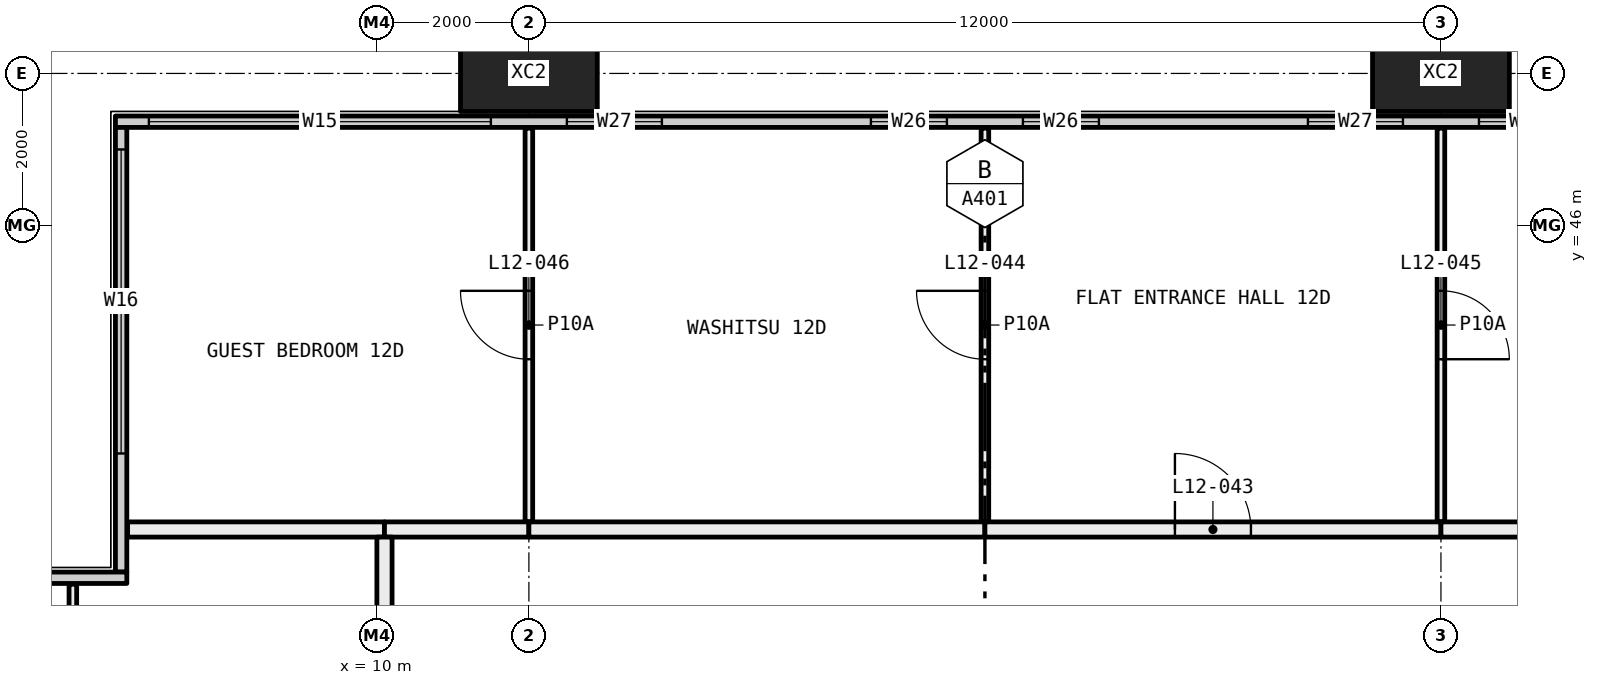
"""IFC4 building model, lengths in metres.
Left out: names, types, materials, properties, quantities, classifications, styles, units other than length and angle.
Written with IfcOpenShell. Run it as: python <this file> out.ifc"""

import sys

from ifc_helpers import new_model, si_unit, direction, frame, frame_2d, origin, origin_2d, place, context, subcontext, project, spatial, rectangle, hollow_rectangle, extrude, element, fill, save


model = new_model("IFC4")
c1 = context("Model", 3, precision=1e-05, world=origin(), true_north=direction((0.0, 1.0)))
c2 = subcontext(c1, "Body", "Model", "MODEL_VIEW")
j1 = project(units=[si_unit("LENGTHUNIT", "METRE"), si_unit("PLANEANGLEUNIT", "RADIAN")], contexts=[c1])
p1 = place(None, origin())
s1 = spatial("IfcSite", under=j1, at=p1, CompositionType="ELEMENT")
p2 = place(p1, origin())
s2 = spatial("IfcBuilding", under=s1, at=p2, CompositionType="ELEMENT")
p3 = place(p2, frame((0.0, 0.0, 54.15)))
s3 = spatial("IfcBuildingStorey", under=s2, at=p3, CompositionType="ELEMENT", Elevation=54.15)
for number, where, z_axis, x_axis in (
    (1, (12.0, 48.0, -0.4), (0.0, 0.0, 1.0), (1.0, 0.0, 0.0)),
    (2, (24.0, 48.0, -0.4), (0.0, 0.0, 1.0), (1.0, 0.0, 0.0)),
):
    element("IfcColumn", number, at=place(p3, frame(where, z_axis=z_axis, x_axis=x_axis)), inside=s3, PredefinedType="COLUMN", context=c2, shape_type="SweptSolid", body=[
        extrude(hollow_rectangle(XDim=1.8, YDim=1.0, WallThickness=0.07, at=origin_2d()), origin(), (0.0, 0.0, 1.0), 3.45),
    ])
p4 = place(p3, frame((6.56, 47.365, 0.0), z_axis=(0.0, 0.0, 1.0), x_axis=(1.0, 0.0, 0.0)))
e3 = element("IfcWall", 3, at=p4, inside=s3, PredefinedType="ELEMENTEDWALL", context=c2, shape_type="SweptSolid", body=[
    extrude(rectangle(XDim=58.88, YDim=0.15, at=frame_2d((29.44, 0.0))), origin(), (0.0, 0.0, 1.0), 3.05),
])
p5 = place(p4, frame((0.44, 0.0, 0.45)))
e4 = element("IfcOpeningElement", 4, at=p5, cuts=e3, PredefinedType="OPENING", context=c2, shape_type="SweptSolid", body=[
    extrude(rectangle(XDim=4.5, YDim=2.55, at=frame_2d((2.25, 1.275))), frame((0.0, 0.085, 0.0), z_axis=(0.0, -1.0, 0.0), x_axis=(1.0, 0.0, 0.0)), (0.0, 0.0, 1.0), 0.17),
])
p6 = place(p4, frame((5.94, 0.0, 0.45)))
e5 = element("IfcOpeningElement", 5, at=p6, cuts=e3, PredefinedType="OPENING", context=c2, shape_type="SweptSolid", body=[
    extrude(rectangle(XDim=1.25, YDim=2.55, at=frame_2d((0.625, 1.275))), frame((0.0, 0.085, 0.0), z_axis=(0.0, -1.0, 0.0), x_axis=(1.0, 0.0, 0.0)), (0.0, 0.0, 1.0), 0.17),
])
p7 = place(p4, frame((9.94, 0.0, 0.45)))
e6 = element("IfcOpeningElement", 6, at=p7, cuts=e3, PredefinedType="OPENING", context=c2, shape_type="SweptSolid", body=[
    extrude(rectangle(XDim=1.0, YDim=2.55, at=frame_2d((0.5, 1.275))), frame((0.0, 0.085, 0.0), z_axis=(0.0, -1.0, 0.0), x_axis=(1.0, 0.0, 0.0)), (0.0, 0.0, 1.0), 0.17),
])
p8 = place(p4, frame((11.94, 0.0, 0.45)))
e7 = element("IfcOpeningElement", 7, at=p8, cuts=e3, PredefinedType="OPENING", context=c2, shape_type="SweptSolid", body=[
    extrude(rectangle(XDim=1.0, YDim=2.55, at=frame_2d((0.5, 1.275))), frame((0.0, 0.085, 0.0), z_axis=(0.0, -1.0, 0.0), x_axis=(1.0, 0.0, 0.0)), (0.0, 0.0, 1.0), 0.17),
])
p9 = place(p4, frame((15.69, 0.0, 0.45)))
e8 = element("IfcOpeningElement", 8, at=p9, cuts=e3, PredefinedType="OPENING", context=c2, shape_type="SweptSolid", body=[
    extrude(rectangle(XDim=1.25, YDim=2.55, at=frame_2d((0.625, 1.275))), frame((0.0, 0.085, 0.0), z_axis=(0.0, -1.0, 0.0), x_axis=(1.0, 0.0, 0.0)), (0.0, 0.0, 1.0), 0.17),
])
p10 = place(p4, frame((17.94, 0.0, 0.45)))
e9 = element("IfcOpeningElement", 9, at=p10, cuts=e3, PredefinedType="OPENING", context=c2, shape_type="SweptSolid", body=[
    extrude(rectangle(XDim=1.25, YDim=2.55, at=frame_2d((0.625, 1.275))), frame((0.0, 0.085, 0.0), z_axis=(0.0, -1.0, 0.0), x_axis=(1.0, 0.0, 0.0)), (0.0, 0.0, 1.0), 0.17),
])
p11 = place(p4, frame((21.94, 0.0, 0.45)))
e10 = element("IfcOpeningElement", 10, at=p11, cuts=e3, PredefinedType="OPENING", context=c2, shape_type="SweptSolid", body=[
    extrude(rectangle(XDim=1.0, YDim=2.55, at=frame_2d((0.5, 1.275))), frame((0.0, 0.085, 0.0), z_axis=(0.0, -1.0, 0.0), x_axis=(1.0, 0.0, 0.0)), (0.0, 0.0, 1.0), 0.17),
])
p12 = place(p4, frame((23.94, 0.0, 0.45)))
e11 = element("IfcOpeningElement", 11, at=p12, cuts=e3, PredefinedType="OPENING", context=c2, shape_type="SweptSolid", body=[
    extrude(rectangle(XDim=1.0, YDim=2.55, at=frame_2d((0.5, 1.275))), frame((0.0, 0.085, 0.0), z_axis=(0.0, -1.0, 0.0), x_axis=(1.0, 0.0, 0.0)), (0.0, 0.0, 1.0), 0.17),
])
p13 = place(p4, frame((27.69, 0.0, 0.45)))
e12 = element("IfcOpeningElement", 12, at=p13, cuts=e3, PredefinedType="OPENING", context=c2, shape_type="SweptSolid", body=[
    extrude(rectangle(XDim=1.25, YDim=2.55, at=frame_2d((0.625, 1.275))), frame((0.0, 0.085, 0.0), z_axis=(0.0, -1.0, 0.0), x_axis=(1.0, 0.0, 0.0)), (0.0, 0.0, 1.0), 0.17),
])
p14 = place(p4, frame((29.94, 0.0, 0.45)))
e13 = element("IfcOpeningElement", 13, at=p14, cuts=e3, PredefinedType="OPENING", context=c2, shape_type="SweptSolid", body=[
    extrude(rectangle(XDim=1.25, YDim=2.55, at=frame_2d((0.625, 1.275))), frame((0.0, 0.085, 0.0), z_axis=(0.0, -1.0, 0.0), x_axis=(1.0, 0.0, 0.0)), (0.0, 0.0, 1.0), 0.17),
])
p15 = place(p4, frame((33.94, 0.0, 0.45)))
e14 = element("IfcOpeningElement", 14, at=p15, cuts=e3, PredefinedType="OPENING", context=c2, shape_type="SweptSolid", body=[
    extrude(rectangle(XDim=1.0, YDim=2.55, at=frame_2d((0.5, 1.275))), frame((0.0, 0.085, 0.0), z_axis=(0.0, -1.0, 0.0), x_axis=(1.0, 0.0, 0.0)), (0.0, 0.0, 1.0), 0.17),
])
p16 = place(p4, frame((35.94, 0.0, 0.45)))
e15 = element("IfcOpeningElement", 15, at=p16, cuts=e3, PredefinedType="OPENING", context=c2, shape_type="SweptSolid", body=[
    extrude(rectangle(XDim=1.0, YDim=2.55, at=frame_2d((0.5, 1.275))), frame((0.0, 0.085, 0.0), z_axis=(0.0, -1.0, 0.0), x_axis=(1.0, 0.0, 0.0)), (0.0, 0.0, 1.0), 0.17),
])
p17 = place(p4, frame((39.69, 0.0, 0.45)))
e16 = element("IfcOpeningElement", 16, at=p17, cuts=e3, PredefinedType="OPENING", context=c2, shape_type="SweptSolid", body=[
    extrude(rectangle(XDim=1.25, YDim=2.55, at=frame_2d((0.625, 1.275))), frame((0.0, 0.085, 0.0), z_axis=(0.0, -1.0, 0.0), x_axis=(1.0, 0.0, 0.0)), (0.0, 0.0, 1.0), 0.17),
])
p18 = place(p4, frame((41.94, 0.0, 0.45)))
e17 = element("IfcOpeningElement", 17, at=p18, cuts=e3, PredefinedType="OPENING", context=c2, shape_type="SweptSolid", body=[
    extrude(rectangle(XDim=1.25, YDim=2.55, at=frame_2d((0.625, 1.275))), frame((0.0, 0.085, 0.0), z_axis=(0.0, -1.0, 0.0), x_axis=(1.0, 0.0, 0.0)), (0.0, 0.0, 1.0), 0.17),
])
p19 = place(p4, frame((45.94, 0.0, 0.45)))
e18 = element("IfcOpeningElement", 18, at=p19, cuts=e3, PredefinedType="OPENING", context=c2, shape_type="SweptSolid", body=[
    extrude(rectangle(XDim=1.0, YDim=2.55, at=frame_2d((0.5, 1.275))), frame((0.0, 0.085, 0.0), z_axis=(0.0, -1.0, 0.0), x_axis=(1.0, 0.0, 0.0)), (0.0, 0.0, 1.0), 0.17),
])
p20 = place(p4, frame((47.94, 0.0, 0.45)))
e19 = element("IfcOpeningElement", 19, at=p20, cuts=e3, PredefinedType="OPENING", context=c2, shape_type="SweptSolid", body=[
    extrude(rectangle(XDim=1.0, YDim=2.55, at=frame_2d((0.5, 1.275))), frame((0.0, 0.085, 0.0), z_axis=(0.0, -1.0, 0.0), x_axis=(1.0, 0.0, 0.0)), (0.0, 0.0, 1.0), 0.17),
])
p21 = place(p4, frame((51.69, 0.0, 0.45)))
e20 = element("IfcOpeningElement", 20, at=p21, cuts=e3, PredefinedType="OPENING", context=c2, shape_type="SweptSolid", body=[
    extrude(rectangle(XDim=1.25, YDim=2.55, at=frame_2d((0.625, 1.275))), frame((0.0, 0.085, 0.0), z_axis=(0.0, -1.0, 0.0), x_axis=(1.0, 0.0, 0.0)), (0.0, 0.0, 1.0), 0.17),
])
p22 = place(p4, frame((53.94, 0.0, 0.45)))
e21 = element("IfcOpeningElement", 21, at=p22, cuts=e3, PredefinedType="OPENING", context=c2, shape_type="SweptSolid", body=[
    extrude(rectangle(XDim=4.5, YDim=2.55, at=frame_2d((2.25, 1.275))), frame((0.0, 0.085, 0.0), z_axis=(0.0, -1.0, 0.0), x_axis=(1.0, 0.0, 0.0)), (0.0, 0.0, 1.0), 0.17),
])
p23 = place(p3, frame((6.635, 41.44, 0.0), z_axis=(0.0, 0.0, 1.0), x_axis=(0.0, 1.0, 0.0)))
e22 = element("IfcWall", 22, at=p23, inside=s3, PredefinedType="ELEMENTEDWALL", context=c2, shape_type="SweptSolid", body=[
    extrude(rectangle(XDim=5.85, YDim=0.15, at=frame_2d((2.925, 0.0))), origin(), (0.0, 0.0, 1.0), 3.05),
])
p24 = place(p23, frame((1.56, 0.0, 0.45)))
e23 = element("IfcOpeningElement", 23, at=p24, cuts=e22, PredefinedType="OPENING", context=c2, shape_type="SweptSolid", body=[
    extrude(rectangle(XDim=4.0, YDim=2.55, at=frame_2d((2.0, 1.275))), frame((0.0, 0.085, 0.0), z_axis=(0.0, -1.0, 0.0), x_axis=(1.0, 0.0, 0.0)), (0.0, 0.0, 1.0), 0.17),
])
p25 = place(p3, frame((0.56, 41.365, 0.0), z_axis=(0.0, 0.0, 1.0), x_axis=(1.0, 0.0, 0.0)))
e24 = element("IfcWall", 24, at=p25, inside=s3, PredefinedType="ELEMENTEDWALL", context=c2, shape_type="SweptSolid", body=[
    extrude(rectangle(XDim=6.15, YDim=0.15, at=frame_2d((3.075, 0.0))), origin(), (0.0, 0.0, 1.0), 3.05),
])
p26 = place(p25, frame((0.44, 0.0, 0.45)))
e25 = element("IfcOpeningElement", 25, at=p26, cuts=e24, PredefinedType="OPENING", context=c2, shape_type="SweptSolid", body=[
    extrude(rectangle(XDim=4.0, YDim=2.55, at=frame_2d((2.0, 1.275))), frame((0.0, 0.085, 0.0), z_axis=(0.0, -1.0, 0.0), x_axis=(1.0, 0.0, 0.0)), (0.0, 0.0, 1.0), 0.17),
])
p27 = place(p3, frame((12.0, 42.1, 0.0), z_axis=(0.0, 0.0, 1.0), x_axis=(0.0, 1.0, 0.0)))
e26 = element("IfcWall", 26, at=p27, inside=s3, PredefinedType="PARTITIONING", context=c2, shape_type="SweptSolid", body=[
    extrude(rectangle(XDim=5.18, YDim=0.1, at=frame_2d((2.59, 0.0))), origin(), (0.0, 0.0, 1.0), 3.05),
])
p28 = place(p27, frame((2.14, 0.0, 0.0)))
e27 = element("IfcOpeningElement", 27, at=p28, cuts=e26, PredefinedType="OPENING", context=c2, shape_type="SweptSolid", body=[
    extrude(rectangle(XDim=0.9, YDim=2.1, at=frame_2d((0.45, 1.05))), frame((0.0, 0.06, 0.0), z_axis=(0.0, -1.0, 0.0), x_axis=(1.0, 0.0, 0.0)), (0.0, 0.0, 1.0), 0.12),
])
p29 = place(p3, frame((6.72, 42.0, 0.0), z_axis=(0.0, 0.0, 1.0), x_axis=(1.0, 0.0, 0.0)))
e28 = element("IfcWall", 28, at=p29, inside=s3, PredefinedType="PARTITIONING", context=c2, shape_type="SweptSolid", body=[
    extrude(rectangle(XDim=3.38, YDim=0.2, at=frame_2d((1.69, 0.0))), origin(), (0.0, 0.0, 1.0), 3.05),
])
p30 = place(p3, frame((10.1, 42.0, 0.0), z_axis=(0.0, 0.0, 1.0), x_axis=(1.0, 0.0, 0.0)))
e29 = element("IfcWall", 29, at=p30, inside=s3, PredefinedType="PARTITIONING", context=c2, shape_type="SweptSolid", body=[
    extrude(rectangle(XDim=1.9, YDim=0.2, at=frame_2d((0.95, 0.0))), origin(), (0.0, 0.0, 1.0), 3.05),
])
p31 = place(p3, frame((18.0, 42.1, 0.0), z_axis=(0.0, 0.0, 1.0), x_axis=(0.0, 1.0, 0.0)))
e30 = element("IfcWall", 30, at=p31, inside=s3, PredefinedType="PARTITIONING", context=c2, shape_type="SweptSolid", body=[
    extrude(rectangle(XDim=5.18, YDim=0.1, at=frame_2d((2.59, 0.0))), origin(), (0.0, 0.0, 1.0), 3.05),
])
p32 = place(p31, frame((2.14, 0.0, 0.0)))
e31 = element("IfcOpeningElement", 31, at=p32, cuts=e30, PredefinedType="OPENING", context=c2, shape_type="SweptSolid", body=[
    extrude(rectangle(XDim=0.9, YDim=2.1, at=frame_2d((0.45, 1.05))), frame((0.0, 0.06, 0.0), z_axis=(0.0, -1.0, 0.0), x_axis=(1.0, 0.0, 0.0)), (0.0, 0.0, 1.0), 0.12),
])
p33 = place(p3, frame((12.0, 42.0, 0.0), z_axis=(0.0, 0.0, 1.0), x_axis=(1.0, 0.0, 0.0)))
e32 = element("IfcWall", 32, at=p33, inside=s3, PredefinedType="PARTITIONING", context=c2, shape_type="SweptSolid", body=[
    extrude(rectangle(XDim=6.0, YDim=0.2, at=frame_2d((3.0, 0.0))), origin(), (0.0, 0.0, 1.0), 3.05),
])
p34 = place(p3, frame((24.0, 42.1, 0.0), z_axis=(0.0, 0.0, 1.0), x_axis=(0.0, 1.0, 0.0)))
e33 = element("IfcWall", 33, at=p34, inside=s3, PredefinedType="PARTITIONING", context=c2, shape_type="SweptSolid", body=[
    extrude(rectangle(XDim=5.18, YDim=0.1, at=frame_2d((2.59, 0.0))), origin(), (0.0, 0.0, 1.0), 3.05),
])
p35 = place(p34, frame((2.14, 0.0, 0.0)))
e34 = element("IfcOpeningElement", 34, at=p35, cuts=e33, PredefinedType="OPENING", context=c2, shape_type="SweptSolid", body=[
    extrude(rectangle(XDim=0.9, YDim=2.1, at=frame_2d((0.45, 1.05))), frame((0.0, 0.06, 0.0), z_axis=(0.0, -1.0, 0.0), x_axis=(1.0, 0.0, 0.0)), (0.0, 0.0, 1.0), 0.12),
])
p36 = place(p3, frame((18.0, 42.0, 0.0), z_axis=(0.0, 0.0, 1.0), x_axis=(1.0, 0.0, 0.0)))
e35 = element("IfcWall", 35, at=p36, inside=s3, PredefinedType="PARTITIONING", context=c2, shape_type="SweptSolid", body=[
    extrude(rectangle(XDim=6.0, YDim=0.2, at=frame_2d((3.0, 0.0))), origin(), (0.0, 0.0, 1.0), 3.05),
])
p37 = place(p36, frame((2.5, 0.0, 0.0)))
e36 = element("IfcOpeningElement", 36, at=p37, cuts=e35, PredefinedType="OPENING", context=c2, shape_type="SweptSolid", body=[
    extrude(rectangle(XDim=1.0, YDim=2.1, at=frame_2d((0.5, 1.05))), frame((0.0, 0.11, 0.0), z_axis=(0.0, -1.0, 0.0), x_axis=(1.0, 0.0, 0.0)), (0.0, 0.0, 1.0), 0.22),
])
p38 = place(p3, frame((24.0, 42.0, 0.0), z_axis=(0.0, 0.0, 1.0), x_axis=(1.0, 0.0, 0.0)))
e37 = element("IfcWall", 37, at=p38, inside=s3, PredefinedType="PARTITIONING", context=c2, shape_type="SweptSolid", body=[
    extrude(rectangle(XDim=1.9, YDim=0.2, at=frame_2d((0.95, 0.0))), origin(), (0.0, 0.0, 1.0), 3.05),
])
p39 = place(p3, frame((6.0, 37.5, 0.0), z_axis=(0.0, 0.0, 1.0), x_axis=(0.0, 1.0, 0.0)))
e38 = element("IfcWall", 38, at=p39, inside=s3, PredefinedType="PARTITIONING", context=c2, shape_type="SweptSolid", body=[
    extrude(rectangle(XDim=3.78, YDim=0.1, at=frame_2d((1.89, 0.0))), origin(), (0.0, 0.0, 1.0), 3.05),
])
p40 = place(p3, frame((10.1, 37.5, 0.0), z_axis=(0.0, 0.0, 1.0), x_axis=(0.0, 1.0, 0.0)))
e39 = element("IfcWall", 39, at=p40, inside=s3, PredefinedType="PARTITIONING", context=c2, shape_type="SweptSolid", body=[
    extrude(rectangle(XDim=4.4, YDim=0.2, at=frame_2d((2.2, 0.0))), origin(), (0.0, 0.0, 1.0), 3.05),
])
p41 = place(p5, origin())
e40 = element("IfcWindow", 40, at=p41, inside=s3, PartitioningType="SINGLE_PANEL", PredefinedType="WINDOW", context=c2, shape_type="SweptSolid", body=[
    extrude(rectangle(XDim=4.5, YDim=2.55, at=frame_2d((2.25, 1.275))), frame((0.0, 0.03, 0.0), z_axis=(0.0, -1.0, 0.0), x_axis=(1.0, 0.0, 0.0)), (0.0, 0.0, 1.0), 0.06),
])
fill(e4, e40)
p42 = place(p6, origin())
e41 = element("IfcWindow", 41, at=p42, inside=s3, PartitioningType="SINGLE_PANEL", PredefinedType="WINDOW", context=c2, shape_type="SweptSolid", body=[
    extrude(rectangle(XDim=1.25, YDim=2.55, at=frame_2d((0.625, 1.275))), frame((0.0, 0.03, 0.0), z_axis=(0.0, -1.0, 0.0), x_axis=(1.0, 0.0, 0.0)), (0.0, 0.0, 1.0), 0.06),
])
fill(e5, e41)
p43 = place(p7, origin())
e42 = element("IfcWindow", 42, at=p43, inside=s3, PartitioningType="SINGLE_PANEL", PredefinedType="WINDOW", context=c2, shape_type="SweptSolid", body=[
    extrude(rectangle(XDim=1.0, YDim=2.55, at=frame_2d((0.5, 1.275))), frame((0.0, 0.03, 0.0), z_axis=(0.0, -1.0, 0.0), x_axis=(1.0, 0.0, 0.0)), (0.0, 0.0, 1.0), 0.06),
])
fill(e6, e42)
p44 = place(p8, origin())
e43 = element("IfcWindow", 43, at=p44, inside=s3, PartitioningType="SINGLE_PANEL", PredefinedType="WINDOW", context=c2, shape_type="SweptSolid", body=[
    extrude(rectangle(XDim=1.0, YDim=2.55, at=frame_2d((0.5, 1.275))), frame((0.0, 0.03, 0.0), z_axis=(0.0, -1.0, 0.0), x_axis=(1.0, 0.0, 0.0)), (0.0, 0.0, 1.0), 0.06),
])
fill(e7, e43)
p45 = place(p9, origin())
e44 = element("IfcWindow", 44, at=p45, inside=s3, PartitioningType="SINGLE_PANEL", PredefinedType="WINDOW", context=c2, shape_type="SweptSolid", body=[
    extrude(rectangle(XDim=1.25, YDim=2.55, at=frame_2d((0.625, 1.275))), frame((0.0, 0.03, 0.0), z_axis=(0.0, -1.0, 0.0), x_axis=(1.0, 0.0, 0.0)), (0.0, 0.0, 1.0), 0.06),
])
fill(e8, e44)
p46 = place(p10, origin())
e45 = element("IfcWindow", 45, at=p46, inside=s3, PartitioningType="SINGLE_PANEL", PredefinedType="WINDOW", context=c2, shape_type="SweptSolid", body=[
    extrude(rectangle(XDim=1.25, YDim=2.55, at=frame_2d((0.625, 1.275))), frame((0.0, 0.03, 0.0), z_axis=(0.0, -1.0, 0.0), x_axis=(1.0, 0.0, 0.0)), (0.0, 0.0, 1.0), 0.06),
])
fill(e9, e45)
p47 = place(p24, origin())
e46 = element("IfcWindow", 46, at=p47, inside=s3, PartitioningType="SINGLE_PANEL", PredefinedType="WINDOW", context=c2, shape_type="SweptSolid", body=[
    extrude(rectangle(XDim=4.0, YDim=2.55, at=frame_2d((2.0, 1.275))), frame((0.0, 0.03, 0.0), z_axis=(0.0, -1.0, 0.0), x_axis=(1.0, 0.0, 0.0)), (0.0, 0.0, 1.0), 0.06),
])
fill(e23, e46)
p48 = place(p37, origin())
e47 = element("IfcDoor", 47, at=p48, inside=s3, OperationType="SINGLE_SWING_RIGHT", PredefinedType="DOOR", context=c2, shape_type="SweptSolid", body=[
    extrude(rectangle(XDim=1.0, YDim=2.1, at=frame_2d((0.5, 1.05))), frame((0.0, 0.025, 0.0), z_axis=(0.0, -1.0, 0.0), x_axis=(1.0, 0.0, 0.0)), (0.0, 0.0, 1.0), 0.05),
])
fill(e36, e47)
p49 = place(p32, origin())
e48 = element("IfcDoor", 48, at=p49, inside=s3, OperationType="SINGLE_SWING_LEFT", PredefinedType="DOOR", context=c2, shape_type="SweptSolid", body=[
    extrude(rectangle(XDim=0.9, YDim=2.1, at=frame_2d((0.45, 1.05))), frame((0.0, 0.025, 0.0), z_axis=(0.0, -1.0, 0.0), x_axis=(1.0, 0.0, 0.0)), (0.0, 0.0, 1.0), 0.05),
])
fill(e31, e48)
p50 = place(p35, frame((0.9, 0.0, 0.0), x_axis=(-1.0, 0.0, 0.0)))
e49 = element("IfcDoor", 49, at=p50, inside=s3, OperationType="SINGLE_SWING_LEFT", PredefinedType="DOOR", context=c2, shape_type="SweptSolid", body=[
    extrude(rectangle(XDim=0.9, YDim=2.1, at=frame_2d((0.45, 1.05))), frame((0.0, 0.025, 0.0), z_axis=(0.0, -1.0, 0.0), x_axis=(1.0, 0.0, 0.0)), (0.0, 0.0, 1.0), 0.05),
])
fill(e34, e49)
p51 = place(p28, origin())
e50 = element("IfcDoor", 50, at=p51, inside=s3, OperationType="SINGLE_SWING_LEFT", PredefinedType="DOOR", context=c2, shape_type="SweptSolid", body=[
    extrude(rectangle(XDim=0.9, YDim=2.1, at=frame_2d((0.45, 1.05))), frame((0.0, 0.025, 0.0), z_axis=(0.0, -1.0, 0.0), x_axis=(1.0, 0.0, 0.0)), (0.0, 0.0, 1.0), 0.05),
])
fill(e27, e50)
save(model, sys.argv[1])
